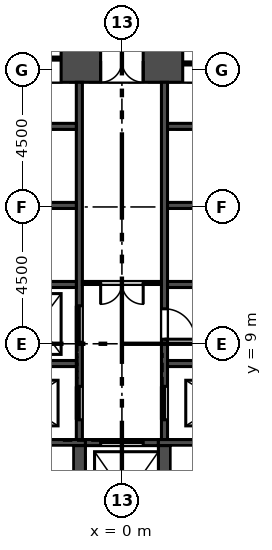
"""IFC4 building model, lengths in metres.
Left out: names, types, materials, properties, quantities, classifications, styles, units other than length and angle.
Written with IfcOpenShell. Run it as: python <this file> out.ifc"""

import sys

from ifc_helpers import new_model, si_unit, direction, frame, frame_2d, origin, place, context, subcontext, project, spatial, rectangle, extrude, element, fill, save


model = new_model("IFC4")
c1 = context("Model", 3, precision=1e-05, world=origin(), true_north=direction((0.0, 1.0)))
c2 = subcontext(c1, "Body", "Model", "MODEL_VIEW")
j1 = project(units=[si_unit("LENGTHUNIT", "METRE"), si_unit("PLANEANGLEUNIT", "RADIAN")], contexts=[c1])
p1 = place(None, origin())
s1 = spatial("IfcSite", under=j1, at=p1, CompositionType="ELEMENT")
p2 = place(p1, origin())
s2 = spatial("IfcBuilding", under=s1, at=p2, CompositionType="ELEMENT")
p3 = place(p2, frame((0.0, 0.0, 47.5)))
s3 = spatial("IfcBuildingStorey", under=s2, at=p3, CompositionType="ELEMENT", Elevation=47.5)
p4 = place(p3, frame((9.412, 18.3, 0.0), z_axis=(0.0, 0.0, 1.0), x_axis=(-1.0, 0.0, 0.0)))
e1 = element("IfcWall", 1, at=p4, inside=s3, PredefinedType="SHEAR", context=c2, shape_type="SweptSolid", body=[
    extrude(rectangle(XDim=18.823, YDim=1.4, at=frame_2d((9.412, 0.0))), origin(), (0.0, 0.0, 1.0), 5.4),
])
p5 = place(p4, frame((8.711, 0.0, 0.0)))
e2 = element("IfcOpeningElement", 2, at=p5, cuts=e1, PredefinedType="OPENING", context=c2, shape_type="SweptSolid", body=[
    extrude(rectangle(XDim=1.4, YDim=2.1, at=frame_2d((0.7, 1.05))), frame((0.0, 0.71, 0.0), z_axis=(0.0, -1.0, 0.0), x_axis=(1.0, 0.0, 0.0)), (0.0, 0.0, 1.0), 1.42),
])
p6 = place(p4, frame((11.412, 0.0, 0.0)))
e3 = element("IfcOpeningElement", 3, at=p6, cuts=e1, PredefinedType="OPENING", context=c2, shape_type="SweptSolid", body=[
    extrude(rectangle(XDim=6.0, YDim=2.4, at=frame_2d((3.0, 1.2))), frame((0.0, 0.71, 0.0), z_axis=(0.0, -1.0, 0.0), x_axis=(1.0, 0.0, 0.0)), (0.0, 0.0, 1.0), 1.42),
])
p7 = place(p4, frame((1.412, 0.0, 0.0)))
e4 = element("IfcOpeningElement", 4, at=p7, cuts=e1, PredefinedType="OPENING", context=c2, shape_type="SweptSolid", body=[
    extrude(rectangle(XDim=6.0, YDim=2.4, at=frame_2d((3.0, 1.2))), frame((0.0, 0.71, 0.0), z_axis=(0.0, -1.0, 0.0), x_axis=(1.0, 0.0, 0.0)), (0.0, 0.0, 1.0), 1.42),
])
p8 = place(p3, frame((-1.4, 5.85, -0.3), z_axis=(0.0, 0.0, 1.0), x_axis=(0.0, 1.0, 0.0)))
e5 = element("IfcWall", 5, at=p8, inside=s3, PredefinedType="SOLIDWALL", context=c2, shape_type="SweptSolid", body=[
    extrude(rectangle(XDim=11.75, YDim=0.2, at=frame_2d((5.875, 0.0))), origin(), (0.0, 0.0, 1.0), 5.4),
])
p9 = place(p8, frame((3.2, 0.0, 0.3)))
e6 = element("IfcOpeningElement", 6, at=p9, cuts=e5, PredefinedType="OPENING", context=c2, shape_type="SweptSolid", body=[
    extrude(rectangle(XDim=1.2, YDim=2.1, at=frame_2d((0.6, 1.05))), frame((0.0, 0.11, 0.0), z_axis=(0.0, -1.0, 0.0), x_axis=(1.0, 0.0, 0.0)), (0.0, 0.0, 1.0), 0.22),
])
p10 = place(p8, frame((0.65, 0.0, 0.3)))
e7 = element("IfcOpeningElement", 7, at=p10, cuts=e5, PredefinedType="OPENING", context=c2, shape_type="SweptSolid", body=[
    extrude(rectangle(XDim=1.1, YDim=2.1, at=frame_2d((0.55, 1.05))), frame((0.0, 0.11, 0.0), z_axis=(0.0, -1.0, 0.0), x_axis=(1.0, 0.0, 0.0)), (0.0, 0.0, 1.0), 0.22),
])
p11 = place(p3, frame((1.4, 5.85, -0.3), z_axis=(0.0, 0.0, 1.0), x_axis=(0.0, 1.0, 0.0)))
e8 = element("IfcWall", 8, at=p11, inside=s3, PredefinedType="SOLIDWALL", context=c2, shape_type="SweptSolid", body=[
    extrude(rectangle(XDim=11.75, YDim=0.2, at=frame_2d((5.875, 0.0))), origin(), (0.0, 0.0, 1.0), 5.4),
])
p12 = place(p11, frame((0.65, 0.0, 0.3)))
e9 = element("IfcOpeningElement", 9, at=p12, cuts=e8, PredefinedType="OPENING", context=c2, shape_type="SweptSolid", body=[
    extrude(rectangle(XDim=1.1, YDim=2.1, at=frame_2d((0.55, 1.05))), frame((0.0, 0.11, 0.0), z_axis=(0.0, -1.0, 0.0), x_axis=(1.0, 0.0, 0.0)), (0.0, 0.0, 1.0), 0.22),
])
p13 = place(p11, frame((3.3, 0.0, 0.3)))
e10 = element("IfcOpeningElement", 10, at=p13, cuts=e8, PredefinedType="OPENING", context=c2, shape_type="SweptSolid", body=[
    extrude(rectangle(XDim=1.0, YDim=2.1, at=frame_2d((0.5, 1.05))), frame((0.0, 0.11, 0.0), z_axis=(0.0, -1.0, 0.0), x_axis=(1.0, 0.0, 0.0)), (0.0, 0.0, 1.0), 0.22),
])
for number, where, z_axis, x_axis in (
    (11, (-5.7, 8.35, -0.3), (0.0, 0.0, 1.0), (1.0, 0.0, 0.0)),
    (12, (1.5, 8.35, -0.3), (0.0, 0.0, 1.0), (1.0, 0.0, 0.0)),
):
    element("IfcWall", number, at=place(p3, frame(where, z_axis=z_axis, x_axis=x_axis)), inside=s3, PredefinedType="SOLIDWALL", context=c2, shape_type="SweptSolid", body=[
        extrude(rectangle(XDim=4.2, YDim=0.2, at=frame_2d((2.1, 0.0))), origin(), (0.0, 0.0, 1.0), 5.4),
    ])
p14 = place(p3, frame((-12.6, 5.75, -0.3), z_axis=(0.0, 0.0, 1.0), x_axis=(1.0, 0.0, 0.0)))
e13 = element("IfcWall", 13, at=p14, inside=s3, PredefinedType="SOLIDWALL", context=c2, shape_type="SweptSolid", body=[
    extrude(rectangle(XDim=11.4, YDim=0.2, at=frame_2d((5.7, 0.0))), origin(), (0.0, 0.0, 1.0), 5.4),
])
p15 = place(p3, frame((-1.2, 5.75, -0.3), z_axis=(0.0, 0.0, 1.0), x_axis=(1.0, 0.0, 0.0)))
e14 = element("IfcWall", 14, at=p15, inside=s3, PredefinedType="SOLIDWALL", context=c2, shape_type="SweptSolid", body=[
    extrude(rectangle(XDim=2.4, YDim=0.2, at=frame_2d((1.2, 0.0))), origin(), (0.0, 0.0, 1.0), 5.4),
])
p16 = place(p15, frame((0.5, 0.0, 0.3)))
e15 = element("IfcOpeningElement", 15, at=p16, cuts=e14, PredefinedType="OPENING", context=c2, shape_type="SweptSolid", body=[
    extrude(rectangle(XDim=1.4, YDim=2.1, at=frame_2d((0.7, 1.05))), frame((0.0, 0.11, 0.0), z_axis=(0.0, -1.0, 0.0), x_axis=(1.0, 0.0, 0.0)), (0.0, 0.0, 1.0), 0.22),
])
p17 = place(p3, frame((1.2, 5.75, -0.3), z_axis=(0.0, 0.0, 1.0), x_axis=(1.0, 0.0, 0.0)))
e16 = element("IfcWall", 16, at=p17, inside=s3, PredefinedType="SOLIDWALL", context=c2, shape_type="SweptSolid", body=[
    extrude(rectangle(XDim=11.4, YDim=0.2, at=frame_2d((5.7, 0.0))), origin(), (0.0, 0.0, 1.0), 5.4),
])
for number, where, z_axis, x_axis in (
    (17, (-1.4, 2.25, -0.3), (0.0, 0.0, 1.0), (0.0, 1.0, 0.0)),
    (18, (1.4, 2.25, -0.3), (0.0, 0.0, 1.0), (0.0, 1.0, 0.0)),
):
    element("IfcWall", number, at=place(p3, frame(where, z_axis=z_axis, x_axis=x_axis)), inside=s3, PredefinedType="SOLIDWALL", context=c2, shape_type="SweptSolid", body=[
        extrude(rectangle(XDim=3.4, YDim=0.4, at=frame_2d((1.7, 0.0))), origin(), (0.0, 0.0, 1.0), 5.4),
    ])
for number, where, z_axis, x_axis in (
    (19, (-3.5, 10.95, -0.3), (0.0, 0.0, 1.0), (1.0, 0.0, 0.0)),
    (20, (-3.5, 13.55, -0.3), (0.0, 0.0, 1.0), (1.0, 0.0, 0.0)),
    (21, (-3.5, 16.15, -0.3), (0.0, 0.0, 1.0), (1.0, 0.0, 0.0)),
    (22, (1.5, 10.95, -0.3), (0.0, 0.0, 1.0), (1.0, 0.0, 0.0)),
    (23, (1.5, 13.55, -0.3), (0.0, 0.0, 1.0), (1.0, 0.0, 0.0)),
    (24, (1.5, 16.15, -0.3), (0.0, 0.0, 1.0), (1.0, 0.0, 0.0)),
):
    element("IfcWall", number, at=place(p3, frame(where, z_axis=z_axis, x_axis=x_axis)), inside=s3, PredefinedType="SOLIDWALL", context=c2, shape_type="SweptSolid", body=[
        extrude(rectangle(XDim=2.0, YDim=0.2, at=frame_2d((1.0, 0.0))), origin(), (0.0, 0.0, 1.0), 5.4),
    ])
p18 = place(p3, frame((-1.3, 11.0, 0.0), z_axis=(0.0, 0.0, 1.0), x_axis=(1.0, 0.0, 0.0)))
e25 = element("IfcWall", 25, at=p18, inside=s3, PredefinedType="PARTITIONING", context=c2, shape_type="SweptSolid", body=[
    extrude(rectangle(XDim=2.6, YDim=0.1, at=frame_2d((1.3, 0.0))), origin(), (0.0, 0.0, 1.0), 5.1),
])
p19 = place(p18, frame((0.6, 0.0, 0.0)))
e26 = element("IfcOpeningElement", 26, at=p19, cuts=e25, PredefinedType="OPENING", context=c2, shape_type="SweptSolid", body=[
    extrude(rectangle(XDim=1.4, YDim=2.1, at=frame_2d((0.7, 1.05))), frame((0.0, 0.06, 0.0), z_axis=(0.0, -1.0, 0.0), x_axis=(1.0, 0.0, 0.0)), (0.0, 0.0, 1.0), 0.12),
])
p20 = place(p9, origin())
e27 = element("IfcDoor", 27, at=p20, inside=s3, OperationType="SLIDING_TO_LEFT", PredefinedType="DOOR", context=c2, shape_type="SweptSolid", body=[
    extrude(rectangle(XDim=1.2, YDim=2.1, at=frame_2d((0.6, 1.05))), frame((0.0, 0.025, 0.0), z_axis=(0.0, -1.0, 0.0), x_axis=(1.0, 0.0, 0.0)), (0.0, 0.0, 1.0), 0.05),
])
fill(e6, e27)
p21 = place(p10, origin())
e28 = element("IfcDoor", 28, at=p21, inside=s3, OperationType="SLIDING_TO_RIGHT", PredefinedType="DOOR", context=c2, shape_type="SweptSolid", body=[
    extrude(rectangle(XDim=1.1, YDim=2.1, at=frame_2d((0.55, 1.05))), frame((0.0, 0.025, 0.0), z_axis=(0.0, -1.0, 0.0), x_axis=(1.0, 0.0, 0.0)), (0.0, 0.0, 1.0), 0.05),
])
fill(e7, e28)
p22 = place(p12, origin())
e29 = element("IfcDoor", 29, at=p22, inside=s3, OperationType="SLIDING_TO_RIGHT", PredefinedType="DOOR", context=c2, shape_type="SweptSolid", body=[
    extrude(rectangle(XDim=1.1, YDim=2.1, at=frame_2d((0.55, 1.05))), frame((0.0, 0.025, 0.0), z_axis=(0.0, -1.0, 0.0), x_axis=(1.0, 0.0, 0.0)), (0.0, 0.0, 1.0), 0.05),
])
fill(e9, e29)
p23 = place(p16, origin())
e30 = element("IfcDoor", 30, at=p23, inside=s3, OperationType="SLIDING_TO_LEFT", PredefinedType="DOOR", context=c2, shape_type="SweptSolid", body=[
    extrude(rectangle(XDim=1.4, YDim=2.1, at=frame_2d((0.7, 1.05))), frame((0.0, 0.025, 0.0), z_axis=(0.0, -1.0, 0.0), x_axis=(1.0, 0.0, 0.0)), (0.0, 0.0, 1.0), 0.05),
])
fill(e15, e30)
p24 = place(p13, frame((1.0, 0.0, 0.0), z_axis=(0.0, 0.0, 1.0), x_axis=(-1.0, 0.0, 0.0)))
e31 = element("IfcDoor", 31, at=p24, inside=s3, OperationType="SINGLE_SWING_RIGHT", PredefinedType="DOOR", context=c2, shape_type="SweptSolid", body=[
    extrude(rectangle(XDim=1.0, YDim=2.1, at=frame_2d((0.5, 1.05))), frame((0.0, 0.025, 0.0), z_axis=(0.0, -1.0, 0.0), x_axis=(1.0, 0.0, 0.0)), (0.0, 0.0, 1.0), 0.05),
])
fill(e10, e31)
p25 = place(p19, frame((1.4, 0.0, 0.0), z_axis=(0.0, 0.0, 1.0), x_axis=(-1.0, 0.0, 0.0)))
e32 = element("IfcDoor", 32, at=p25, inside=s3, OperationType="DOUBLE_DOOR_SINGLE_SWING", PredefinedType="DOOR", context=c2, shape_type="SweptSolid", body=[
    extrude(rectangle(XDim=1.4, YDim=2.1, at=frame_2d((0.7, 1.05))), frame((0.0, 0.025, 0.0), z_axis=(0.0, -1.0, 0.0), x_axis=(1.0, 0.0, 0.0)), (0.0, 0.0, 1.0), 0.05),
])
fill(e26, e32)
p26 = place(p5, origin())
e33 = element("IfcDoor", 33, at=p26, inside=s3, OperationType="DOUBLE_DOOR_SINGLE_SWING", PredefinedType="DOOR", context=c2, shape_type="SweptSolid", body=[
    extrude(rectangle(XDim=1.4, YDim=2.1, at=frame_2d((0.7, 1.05))), frame((0.0, 0.025, 0.0), z_axis=(0.0, -1.0, 0.0), x_axis=(1.0, 0.0, 0.0)), (0.0, 0.0, 1.0), 0.05),
])
fill(e2, e33)
p27 = place(p6, origin())
e34 = element("IfcDoor", 34, at=p27, inside=s3, OperationType="DOUBLE_DOOR_SLIDING", PredefinedType="DOOR", context=c2, shape_type="SweptSolid", body=[
    extrude(rectangle(XDim=6.0, YDim=2.4, at=frame_2d((3.0, 1.2))), frame((0.0, 0.025, 0.0), z_axis=(0.0, -1.0, 0.0), x_axis=(1.0, 0.0, 0.0)), (0.0, 0.0, 1.0), 0.05),
])
fill(e3, e34)
p28 = place(p7, origin())
e35 = element("IfcDoor", 35, at=p28, inside=s3, OperationType="DOUBLE_DOOR_SLIDING", PredefinedType="DOOR", context=c2, shape_type="SweptSolid", body=[
    extrude(rectangle(XDim=6.0, YDim=2.4, at=frame_2d((3.0, 1.2))), frame((0.0, 0.025, 0.0), z_axis=(0.0, -1.0, 0.0), x_axis=(1.0, 0.0, 0.0)), (0.0, 0.0, 1.0), 0.05),
])
fill(e4, e35)
save(model, sys.argv[1])
